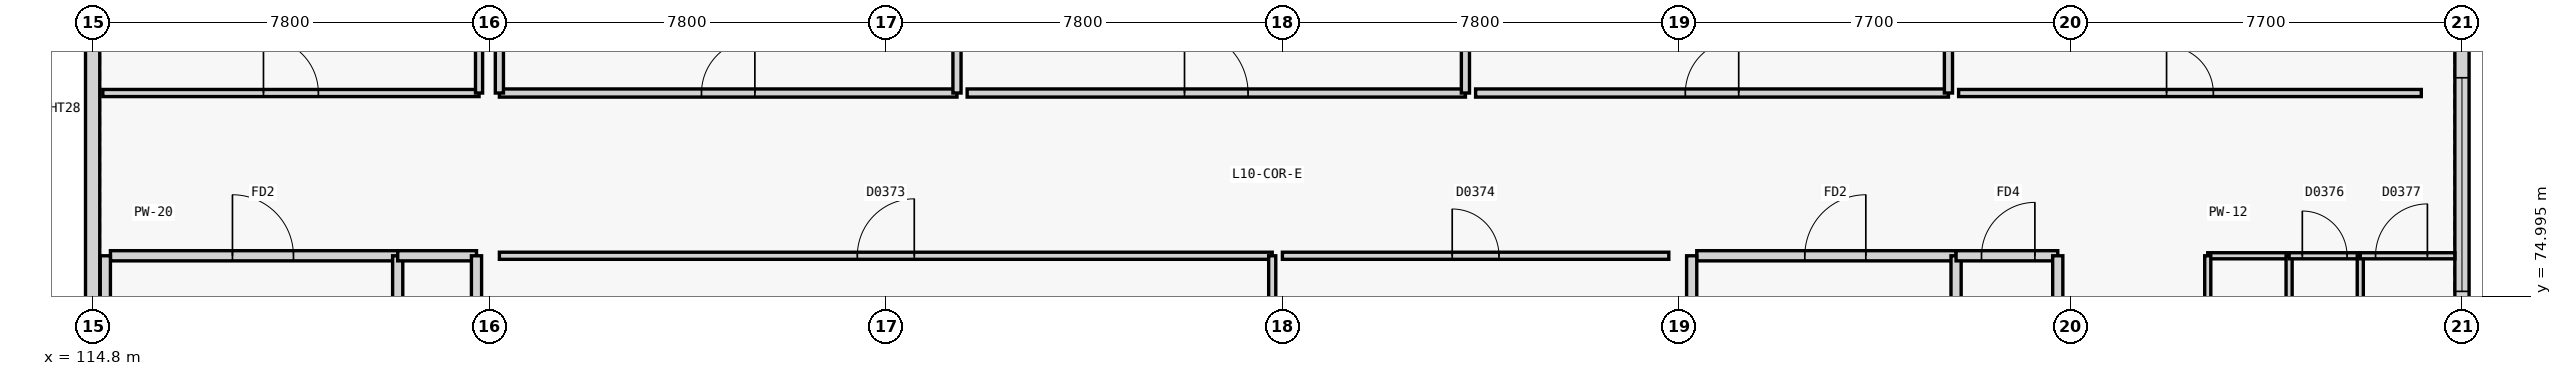
"""IFC4 building model, lengths in metres.
Left out: names, types, materials, properties, quantities, classifications, styles, units other than length and angle.
Written with IfcOpenShell. Run it as: python <this file> out.ifc"""

import sys

from ifc_helpers import new_model, si_unit, direction, frame, frame_2d, origin, place, context, subcontext, project, spatial, rectangle, extrude, element, fill, save


model = new_model("IFC4")
c1 = context("Model", 3, precision=1e-05, world=origin(), true_north=direction((0.0, 1.0)))
c2 = subcontext(c1, "Body", "Model", "MODEL_VIEW")
j1 = project(units=[si_unit("LENGTHUNIT", "METRE"), si_unit("PLANEANGLEUNIT", "RADIAN")], contexts=[c1])
p1 = place(None, origin())
s1 = spatial("IfcSite", under=j1, at=p1, CompositionType="ELEMENT")
p2 = place(p1, origin())
s2 = spatial("IfcBuilding", under=s1, at=p2, CompositionType="ELEMENT")
p3 = place(p2, frame((0.0, 0.0, 39.6)))
s3 = spatial("IfcBuildingStorey", under=s2, at=p3, CompositionType="ELEMENT", Elevation=39.6)
p4 = place(p3, frame((161.4, 96.822, 0.0), z_axis=(0.0, 0.0, 1.0), x_axis=(0.0, -1.0, 0.0)))
e1 = element("IfcWall", 1, at=p4, inside=s3, PredefinedType="SOLIDWALL", context=c2, shape_type="SweptSolid", body=[
    extrude(rectangle(XDim=32.644, YDim=0.28, at=frame_2d((16.322, 0.0))), origin(), (0.0, 0.0, 1.0), 2.79),
])
p5 = place(p4, frame((17.522, 0.0, 0.82)))
e2 = element("IfcOpeningElement", 2, at=p5, cuts=e1, PredefinedType="OPENING", context=c2, shape_type="SweptSolid", body=[
    extrude(rectangle(XDim=4.2, YDim=1.5, at=frame_2d((2.1, 0.75))), frame((0.0, 0.15, 0.0), z_axis=(0.0, -1.0, 0.0), x_axis=(1.0, 0.0, 0.0)), (0.0, 0.0, 1.0), 0.3),
])
p6 = place(p3, frame((114.8, 72.578, 0.0), z_axis=(0.0, 0.0, 1.0), x_axis=(0.0, 1.0, 0.0)))
e3 = element("IfcWall", 3, at=p6, inside=s3, PredefinedType="SOLIDWALL", context=c2, shape_type="SweptSolid", body=[
    extrude(rectangle(XDim=12.244, YDim=0.28, at=frame_2d((6.122, 0.0))), origin(), (0.0, 0.0, 1.0), 2.79),
])
p7 = place(p3, frame((115.15, 75.8, 0.0), z_axis=(0.0, 0.0, 1.0), x_axis=(1.0, 0.0, 0.0)))
e4 = element("IfcWall", 4, at=p7, inside=s3, PredefinedType="PARTITIONING", context=c2, shape_type="SweptSolid", body=[
    extrude(rectangle(XDim=5.65, YDim=0.2, at=frame_2d((2.825, 0.0))), origin(), (0.0, 0.0, 1.0), 3.32),
])
p8 = place(p7, frame((2.4, 0.0, 0.0)))
e5 = element("IfcOpeningElement", 5, at=p8, cuts=e4, PredefinedType="OPENING", context=c2, shape_type="SweptSolid", body=[
    extrude(rectangle(XDim=1.2, YDim=2.2, at=frame_2d((0.6, 1.1))), frame((0.0, 0.11, 0.0), z_axis=(0.0, -1.0, 0.0), x_axis=(1.0, 0.0, 0.0)), (0.0, 0.0, 1.0), 0.22),
])
p9 = place(p3, frame((115.05, 72.4, 0.0), z_axis=(0.0, 0.0, 1.0), x_axis=(0.0, 1.0, 0.0)))
e6 = element("IfcWall", 6, at=p9, inside=s3, PredefinedType="PARTITIONING", context=c2, shape_type="SweptSolid", body=[
    extrude(rectangle(XDim=3.4, YDim=0.2, at=frame_2d((1.7, 0.0))), origin(), (0.0, 0.0, 1.0), 2.79),
])
p10 = place(p3, frame((120.8, 72.4, 0.0), z_axis=(0.0, 0.0, 1.0), x_axis=(0.0, 1.0, 0.0)))
e7 = element("IfcWall", 7, at=p10, inside=s3, PredefinedType="PARTITIONING", context=c2, shape_type="SweptSolid", body=[
    extrude(rectangle(XDim=3.4, YDim=0.2, at=frame_2d((1.7, 0.0))), origin(), (0.0, 0.0, 1.0), 3.32),
])
p11 = place(p10, frame((1.1, 0.0, 0.0)))
e8 = element("IfcOpeningElement", 8, at=p11, cuts=e7, PredefinedType="OPENING", context=c2, shape_type="SweptSolid", body=[
    extrude(rectangle(XDim=1.2, YDim=2.2, at=frame_2d((0.6, 1.1))), frame((0.0, 0.11, 0.0), z_axis=(0.0, -1.0, 0.0), x_axis=(1.0, 0.0, 0.0)), (0.0, 0.0, 1.0), 0.22),
])
p12 = place(p3, frame((120.8, 75.8, 0.0), z_axis=(0.0, 0.0, 1.0), x_axis=(1.0, 0.0, 0.0)))
e9 = element("IfcWall", 9, at=p12, inside=s3, PredefinedType="PARTITIONING", context=c2, shape_type="SweptSolid", body=[
    extrude(rectangle(XDim=1.55, YDim=0.2, at=frame_2d((0.775, 0.0))), origin(), (0.0, 0.0, 1.0), 3.32),
])
p13 = place(p3, frame((122.35, 72.4, 0.0), z_axis=(0.0, 0.0, 1.0), x_axis=(0.0, 1.0, 0.0)))
e10 = element("IfcWall", 10, at=p13, inside=s3, PredefinedType="PARTITIONING", context=c2, shape_type="SweptSolid", body=[
    extrude(rectangle(XDim=3.4, YDim=0.2, at=frame_2d((1.7, 0.0))), origin(), (0.0, 0.0, 1.0), 2.87),
])
p14 = place(p3, frame((146.35, 75.8, 0.0), z_axis=(0.0, 0.0, 1.0), x_axis=(1.0, 0.0, 0.0)))
e11 = element("IfcWall", 11, at=p14, inside=s3, PredefinedType="PARTITIONING", context=c2, shape_type="SweptSolid", body=[
    extrude(rectangle(XDim=5.1, YDim=0.2, at=frame_2d((2.55, 0.0))), origin(), (0.0, 0.0, 1.0), 3.32),
])
p15 = place(p14, frame((2.125, 0.0, 0.0)))
e12 = element("IfcOpeningElement", 12, at=p15, cuts=e11, PredefinedType="OPENING", context=c2, shape_type="SweptSolid", body=[
    extrude(rectangle(XDim=1.2, YDim=2.2, at=frame_2d((0.6, 1.1))), frame((0.0, 0.11, 0.0), z_axis=(0.0, -1.0, 0.0), x_axis=(1.0, 0.0, 0.0)), (0.0, 0.0, 1.0), 0.22),
])
p16 = place(p3, frame((146.25, 72.4, 0.0), z_axis=(0.0, 0.0, 1.0), x_axis=(0.0, 1.0, 0.0)))
e13 = element("IfcWall", 13, at=p16, inside=s3, PredefinedType="PARTITIONING", context=c2, shape_type="SweptSolid", body=[
    extrude(rectangle(XDim=3.4, YDim=0.2, at=frame_2d((1.7, 0.0))), origin(), (0.0, 0.0, 1.0), 2.87),
])
p17 = place(p3, frame((151.45, 72.4, 0.0), z_axis=(0.0, 0.0, 1.0), x_axis=(0.0, 1.0, 0.0)))
e14 = element("IfcWall", 14, at=p17, inside=s3, PredefinedType="PARTITIONING", context=c2, shape_type="SweptSolid", body=[
    extrude(rectangle(XDim=3.4, YDim=0.2, at=frame_2d((1.7, 0.0))), origin(), (0.0, 0.0, 1.0), 3.32),
])
p18 = place(p17, frame((1.1, 0.0, 0.0)))
e15 = element("IfcOpeningElement", 15, at=p18, cuts=e14, PredefinedType="OPENING", context=c2, shape_type="SweptSolid", body=[
    extrude(rectangle(XDim=1.2, YDim=2.2, at=frame_2d((0.6, 1.1))), frame((0.0, 0.11, 0.0), z_axis=(0.0, -1.0, 0.0), x_axis=(1.0, 0.0, 0.0)), (0.0, 0.0, 1.0), 0.22),
])
p19 = place(p3, frame((151.45, 75.8, 0.0), z_axis=(0.0, 0.0, 1.0), x_axis=(1.0, 0.0, 0.0)))
e16 = element("IfcWall", 16, at=p19, inside=s3, PredefinedType="PARTITIONING", context=c2, shape_type="SweptSolid", body=[
    extrude(rectangle(XDim=2.0, YDim=0.2, at=frame_2d((1.0, 0.0))), origin(), (0.0, 0.0, 1.0), 3.32),
])
p20 = place(p19, frame((0.5, 0.0, 0.0)))
e17 = element("IfcOpeningElement", 17, at=p20, cuts=e16, PredefinedType="OPENING", context=c2, shape_type="SweptSolid", body=[
    extrude(rectangle(XDim=1.05, YDim=2.15, at=frame_2d((0.525, 1.075))), frame((0.0, 0.11, 0.0), z_axis=(0.0, -1.0, 0.0), x_axis=(1.0, 0.0, 0.0)), (0.0, 0.0, 1.0), 0.22),
])
p21 = place(p3, frame((153.45, 72.4, 0.0), z_axis=(0.0, 0.0, 1.0), x_axis=(0.0, 1.0, 0.0)))
e18 = element("IfcWall", 18, at=p21, inside=s3, PredefinedType="PARTITIONING", context=c2, shape_type="SweptSolid", body=[
    extrude(rectangle(XDim=3.4, YDim=0.2, at=frame_2d((1.7, 0.0))), origin(), (0.0, 0.0, 1.0), 2.87),
])
p22 = place(p3, frame((115.0, 79.0, 0.0), z_axis=(0.0, 0.0, 1.0), x_axis=(1.0, 0.0, 0.0)))
e19 = element("IfcWall", 19, at=p22, inside=s3, PredefinedType="PARTITIONING", context=c2, shape_type="SweptSolid", body=[
    extrude(rectangle(XDim=7.4, YDim=0.14, at=frame_2d((3.7, 0.0))), origin(), (0.0, 0.0, 1.0), 3.34),
])
p23 = place(p22, frame((3.16, 0.0, 0.0)))
e20 = element("IfcOpeningElement", 20, at=p23, cuts=e19, PredefinedType="OPENING", context=c2, shape_type="SweptSolid", body=[
    extrude(rectangle(XDim=1.08, YDim=2.2, at=frame_2d((0.54, 1.1))), frame((0.0, 0.08, 0.0), z_axis=(0.0, -1.0, 0.0), x_axis=(1.0, 0.0, 0.0)), (0.0, 0.0, 1.0), 0.16),
])
p24 = place(p3, frame((122.4, 79.0, 0.0), z_axis=(0.0, 0.0, 1.0), x_axis=(0.0, 1.0, 0.0)))
e21 = element("IfcWall", 21, at=p24, inside=s3, PredefinedType="PARTITIONING", context=c2, shape_type="SweptSolid", body=[
    extrude(rectangle(XDim=5.4, YDim=0.14, at=frame_2d((2.7, 0.0))), origin(), (0.0, 0.0, 1.0), 2.87),
])
p25 = place(p3, frame((122.8, 75.8, 0.0), z_axis=(0.0, 0.0, 1.0), x_axis=(1.0, 0.0, 0.0)))
e22 = element("IfcWall", 22, at=p25, inside=s3, PredefinedType="PARTITIONING", context=c2, shape_type="SweptSolid", body=[
    extrude(rectangle(XDim=15.2, YDim=0.14, at=frame_2d((7.6, 0.0))), origin(), (0.0, 0.0, 1.0), 3.34),
])
p26 = place(p25, frame((7.04, 0.0, 0.0)))
e23 = element("IfcOpeningElement", 23, at=p26, cuts=e22, PredefinedType="OPENING", context=c2, shape_type="SweptSolid", body=[
    extrude(rectangle(XDim=1.12, YDim=2.15, at=frame_2d((0.56, 1.075))), frame((0.0, 0.08, 0.0), z_axis=(0.0, -1.0, 0.0), x_axis=(1.0, 0.0, 0.0)), (0.0, 0.0, 1.0), 0.16),
])
p27 = place(p3, frame((138.0, 65.2, 0.0), z_axis=(0.0, 0.0, 1.0), x_axis=(0.0, 1.0, 0.0)))
e24 = element("IfcWall", 24, at=p27, inside=s3, PredefinedType="PARTITIONING", context=c2, shape_type="SweptSolid", body=[
    extrude(rectangle(XDim=10.6, YDim=0.14, at=frame_2d((5.3, 0.0))), origin(), (0.0, 0.0, 1.0), 2.87),
])
p28 = place(p3, frame((138.2, 75.8, 0.0), z_axis=(0.0, 0.0, 1.0), x_axis=(1.0, 0.0, 0.0)))
e25 = element("IfcWall", 25, at=p28, inside=s3, PredefinedType="PARTITIONING", context=c2, shape_type="SweptSolid", body=[
    extrude(rectangle(XDim=7.6, YDim=0.14, at=frame_2d((3.8, 0.0))), origin(), (0.0, 0.0, 1.0), 3.34),
])
p29 = place(p28, frame((3.34, 0.0, 0.0)))
e26 = element("IfcOpeningElement", 26, at=p29, cuts=e25, PredefinedType="OPENING", context=c2, shape_type="SweptSolid", body=[
    extrude(rectangle(XDim=0.92, YDim=2.15, at=frame_2d((0.46, 1.075))), frame((0.0, 0.08, 0.0), z_axis=(0.0, -1.0, 0.0), x_axis=(1.0, 0.0, 0.0)), (0.0, 0.0, 1.0), 0.16),
])
p30 = place(p3, frame((156.4, 75.8, 0.0), z_axis=(0.0, 0.0, 1.0), x_axis=(1.0, 0.0, 0.0)))
e27 = element("IfcWall", 27, at=p30, inside=s3, PredefinedType="PARTITIONING", context=c2, shape_type="SweptSolid", body=[
    extrude(rectangle(XDim=1.6, YDim=0.12, at=frame_2d((0.8, 0.0))), origin(), (0.0, 0.0, 1.0), 3.34),
])
p31 = place(p3, frame((156.4, 70.6, 0.0), z_axis=(0.0, 0.0, 1.0), x_axis=(0.0, 1.0, 0.0)))
e28 = element("IfcWall", 28, at=p31, inside=s3, PredefinedType="PARTITIONING", context=c2, shape_type="SweptSolid", body=[
    extrude(rectangle(XDim=5.2, YDim=0.12, at=frame_2d((2.6, 0.0))), origin(), (0.0, 0.0, 1.0), 3.34),
])
p32 = place(p31, frame((2.16, 0.0, 0.0)))
e29 = element("IfcOpeningElement", 29, at=p32, cuts=e28, PredefinedType="OPENING", context=c2, shape_type="SweptSolid", body=[
    extrude(rectangle(XDim=0.88, YDim=2.1, at=frame_2d((0.44, 1.05))), frame((0.0, 0.07, 0.0), z_axis=(0.0, -1.0, 0.0), x_axis=(1.0, 0.0, 0.0)), (0.0, 0.0, 1.0), 0.14),
])
p33 = place(p3, frame((158.0, 70.6, 0.0), z_axis=(0.0, 0.0, 1.0), x_axis=(0.0, 1.0, 0.0)))
e30 = element("IfcWall", 30, at=p33, inside=s3, PredefinedType="PARTITIONING", context=c2, shape_type="SweptSolid", body=[
    extrude(rectangle(XDim=5.2, YDim=0.12, at=frame_2d((2.6, 0.0))), origin(), (0.0, 0.0, 1.0), 3.34),
])
p34 = place(p3, frame((158.0, 75.8, 0.0), z_axis=(0.0, 0.0, 1.0), x_axis=(1.0, 0.0, 0.0)))
e31 = element("IfcWall", 31, at=p34, inside=s3, PredefinedType="PARTITIONING", context=c2, shape_type="SweptSolid", body=[
    extrude(rectangle(XDim=1.4, YDim=0.12, at=frame_2d((0.7, 0.0))), origin(), (0.0, 0.0, 1.0), 3.34),
])
p35 = place(p34, frame((0.26, 0.0, 0.0)))
e32 = element("IfcOpeningElement", 32, at=p35, cuts=e31, PredefinedType="OPENING", context=c2, shape_type="SweptSolid", body=[
    extrude(rectangle(XDim=0.88, YDim=2.1, at=frame_2d((0.44, 1.05))), frame((0.0, 0.07, 0.0), z_axis=(0.0, -1.0, 0.0), x_axis=(1.0, 0.0, 0.0)), (0.0, 0.0, 1.0), 0.14),
])
p36 = place(p3, frame((159.4, 70.6, 0.0), z_axis=(0.0, 0.0, 1.0), x_axis=(0.0, 1.0, 0.0)))
e33 = element("IfcWall", 33, at=p36, inside=s3, PredefinedType="PARTITIONING", context=c2, shape_type="SweptSolid", body=[
    extrude(rectangle(XDim=5.2, YDim=0.12, at=frame_2d((2.6, 0.0))), origin(), (0.0, 0.0, 1.0), 3.34),
])
p37 = place(p3, frame((159.4, 75.8, 0.0), z_axis=(0.0, 0.0, 1.0), x_axis=(1.0, 0.0, 0.0)))
e34 = element("IfcWall", 34, at=p37, inside=s3, PredefinedType="PARTITIONING", context=c2, shape_type="SweptSolid", body=[
    extrude(rectangle(XDim=1.86, YDim=0.12, at=frame_2d((0.93, 0.0))), origin(), (0.0, 0.0, 1.0), 3.34),
])
p38 = place(p37, frame((0.3, 0.0, 0.0)))
e35 = element("IfcOpeningElement", 35, at=p38, cuts=e34, PredefinedType="OPENING", context=c2, shape_type="SweptSolid", body=[
    extrude(rectangle(XDim=1.02, YDim=2.1, at=frame_2d((0.51, 1.05))), frame((0.0, 0.07, 0.0), z_axis=(0.0, -1.0, 0.0), x_axis=(1.0, 0.0, 0.0)), (0.0, 0.0, 1.0), 0.14),
])
p39 = place(p3, frame((122.8, 79.0, 0.0), z_axis=(0.0, 0.0, 1.0), x_axis=(1.0, 0.0, 0.0)))
e36 = element("IfcWall", 36, at=p39, inside=s3, PredefinedType="PARTITIONING", context=c2, shape_type="SweptSolid", body=[
    extrude(rectangle(XDim=9.0, YDim=0.16, at=frame_2d((4.5, 0.0))), origin(), (0.0, 0.0, 1.0), 3.34),
])
p40 = place(p39, frame((3.975, 0.0, 0.0)))
e37 = element("IfcOpeningElement", 37, at=p40, cuts=e36, PredefinedType="OPENING", context=c2, shape_type="SweptSolid", body=[
    extrude(rectangle(XDim=1.05, YDim=2.15, at=frame_2d((0.525, 1.075))), frame((0.0, 0.09, 0.0), z_axis=(0.0, -1.0, 0.0), x_axis=(1.0, 0.0, 0.0)), (0.0, 0.0, 1.0), 0.18),
])
p41 = place(p3, frame((122.8, 79.0, 0.0), z_axis=(0.0, 0.0, 1.0), x_axis=(0.0, 1.0, 0.0)))
e38 = element("IfcWall", 38, at=p41, inside=s3, PredefinedType="PARTITIONING", context=c2, shape_type="SweptSolid", body=[
    extrude(rectangle(XDim=17.6, YDim=0.16, at=frame_2d((8.8, 0.0))), origin(), (0.0, 0.0, 1.0), 2.87),
])
p42 = place(p3, frame((131.8, 79.0, 0.0), z_axis=(0.0, 0.0, 1.0), x_axis=(0.0, 1.0, 0.0)))
e39 = element("IfcWall", 39, at=p42, inside=s3, PredefinedType="PARTITIONING", context=c2, shape_type="SweptSolid", body=[
    extrude(rectangle(XDim=17.6, YDim=0.16, at=frame_2d((8.8, 0.0))), origin(), (0.0, 0.0, 1.0), 3.34),
])
p43 = place(p3, frame((132.0, 79.0, 0.0), z_axis=(0.0, 0.0, 1.0), x_axis=(1.0, 0.0, 0.0)))
e40 = element("IfcWall", 40, at=p43, inside=s3, PredefinedType="PARTITIONING", context=c2, shape_type="SweptSolid", body=[
    extrude(rectangle(XDim=9.8, YDim=0.16, at=frame_2d((4.9, 0.0))), origin(), (0.0, 0.0, 1.0), 3.34),
])
p44 = place(p43, frame((4.275, 0.0, 0.0)))
e41 = element("IfcOpeningElement", 41, at=p44, cuts=e40, PredefinedType="OPENING", context=c2, shape_type="SweptSolid", body=[
    extrude(rectangle(XDim=1.25, YDim=2.2, at=frame_2d((0.625, 1.1))), frame((0.0, 0.09, 0.0), z_axis=(0.0, -1.0, 0.0), x_axis=(1.0, 0.0, 0.0)), (0.0, 0.0, 1.0), 0.18),
])
p45 = place(p3, frame((141.8, 79.0, 0.0), z_axis=(0.0, 0.0, 1.0), x_axis=(0.0, 1.0, 0.0)))
e42 = element("IfcWall", 42, at=p45, inside=s3, PredefinedType="PARTITIONING", context=c2, shape_type="SweptSolid", body=[
    extrude(rectangle(XDim=17.6, YDim=0.16, at=frame_2d((8.8, 0.0))), origin(), (0.0, 0.0, 1.0), 2.91),
])
p46 = place(p3, frame((142.0, 79.0, 0.0), z_axis=(0.0, 0.0, 1.0), x_axis=(1.0, 0.0, 0.0)))
e43 = element("IfcWall", 43, at=p46, inside=s3, PredefinedType="PARTITIONING", context=c2, shape_type="SweptSolid", body=[
    extrude(rectangle(XDim=9.3, YDim=0.16, at=frame_2d((4.65, 0.0))), origin(), (0.0, 0.0, 1.0), 3.34),
])
p47 = place(p46, frame((4.125, 0.0, 0.0)))
e44 = element("IfcOpeningElement", 44, at=p47, cuts=e43, PredefinedType="OPENING", context=c2, shape_type="SweptSolid", body=[
    extrude(rectangle(XDim=1.05, YDim=2.15, at=frame_2d((0.525, 1.075))), frame((0.0, 0.09, 0.0), z_axis=(0.0, -1.0, 0.0), x_axis=(1.0, 0.0, 0.0)), (0.0, 0.0, 1.0), 0.18),
])
p48 = place(p3, frame((151.3, 79.0, 0.0), z_axis=(0.0, 0.0, 1.0), x_axis=(0.0, 1.0, 0.0)))
e45 = element("IfcWall", 45, at=p48, inside=s3, PredefinedType="PARTITIONING", context=c2, shape_type="SweptSolid", body=[
    extrude(rectangle(XDim=17.6, YDim=0.16, at=frame_2d((8.8, 0.0))), origin(), (0.0, 0.0, 1.0), 3.34),
])
p49 = place(p3, frame((151.5, 79.0, 0.0), z_axis=(0.0, 0.0, 1.0), x_axis=(1.0, 0.0, 0.0)))
e46 = element("IfcWall", 46, at=p49, inside=s3, PredefinedType="PARTITIONING", context=c2, shape_type="SweptSolid", body=[
    extrude(rectangle(XDim=9.1, YDim=0.14, at=frame_2d((4.55, 0.0))), origin(), (0.0, 0.0, 1.0), 3.34),
])
p50 = place(p49, frame((4.09, 0.0, 0.0)))
e47 = element("IfcOpeningElement", 47, at=p50, cuts=e46, PredefinedType="OPENING", context=c2, shape_type="SweptSolid", body=[
    extrude(rectangle(XDim=0.92, YDim=2.15, at=frame_2d((0.46, 1.075))), frame((0.0, 0.08, 0.0), z_axis=(0.0, -1.0, 0.0), x_axis=(1.0, 0.0, 0.0)), (0.0, 0.0, 1.0), 0.16),
])
p51 = place(p5, origin())
e48 = element("IfcWindow", 48, at=p51, inside=s3, PartitioningType="SINGLE_PANEL", PredefinedType="WINDOW", context=c2, shape_type="SweptSolid", body=[
    extrude(rectangle(XDim=4.2, YDim=1.5, at=frame_2d((2.1, 0.75))), frame((0.0, 0.03, 0.0), z_axis=(0.0, -1.0, 0.0), x_axis=(1.0, 0.0, 0.0)), (0.0, 0.0, 1.0), 0.06),
])
fill(e2, e48)
p52 = place(p8, origin())
e49 = element("IfcDoor", 49, at=p52, inside=s3, OperationType="SINGLE_SWING_LEFT", PredefinedType="DOOR", context=c2, shape_type="SweptSolid", body=[
    extrude(rectangle(XDim=1.2, YDim=2.2, at=frame_2d((0.6, 1.1))), frame((0.0, 0.025, 0.0), z_axis=(0.0, -1.0, 0.0), x_axis=(1.0, 0.0, 0.0)), (0.0, 0.0, 1.0), 0.05),
])
fill(e5, e49)
p53 = place(p15, origin())
e50 = element("IfcDoor", 50, at=p53, inside=s3, OperationType="SINGLE_SWING_RIGHT", PredefinedType="DOOR", context=c2, shape_type="SweptSolid", body=[
    extrude(rectangle(XDim=1.2, YDim=2.2, at=frame_2d((0.6, 1.1))), frame((0.0, 0.025, 0.0), z_axis=(0.0, -1.0, 0.0), x_axis=(1.0, 0.0, 0.0)), (0.0, 0.0, 1.0), 0.05),
])
fill(e12, e50)
p54 = place(p20, origin())
e51 = element("IfcDoor", 51, at=p54, inside=s3, OperationType="SINGLE_SWING_RIGHT", PredefinedType="DOOR", context=c2, shape_type="SweptSolid", body=[
    extrude(rectangle(XDim=1.05, YDim=2.15, at=frame_2d((0.525, 1.075))), frame((0.0, 0.025, 0.0), z_axis=(0.0, -1.0, 0.0), x_axis=(1.0, 0.0, 0.0)), (0.0, 0.0, 1.0), 0.05),
])
fill(e17, e51)
p55 = place(p23, origin())
e52 = element("IfcDoor", 52, at=p55, inside=s3, OperationType="SINGLE_SWING_LEFT", PredefinedType="DOOR", context=c2, shape_type="SweptSolid", body=[
    extrude(rectangle(XDim=1.08, YDim=2.2, at=frame_2d((0.54, 1.1))), frame((0.0, 0.025, 0.0), z_axis=(0.0, -1.0, 0.0), x_axis=(1.0, 0.0, 0.0)), (0.0, 0.0, 1.0), 0.05),
])
fill(e20, e52)
p56 = place(p26, origin())
e53 = element("IfcDoor", 53, at=p56, inside=s3, OperationType="SINGLE_SWING_RIGHT", PredefinedType="DOOR", context=c2, shape_type="SweptSolid", body=[
    extrude(rectangle(XDim=1.12, YDim=2.15, at=frame_2d((0.56, 1.075))), frame((0.0, 0.025, 0.0), z_axis=(0.0, -1.0, 0.0), x_axis=(1.0, 0.0, 0.0)), (0.0, 0.0, 1.0), 0.05),
])
fill(e23, e53)
p57 = place(p29, origin())
e54 = element("IfcDoor", 54, at=p57, inside=s3, OperationType="SINGLE_SWING_LEFT", PredefinedType="DOOR", context=c2, shape_type="SweptSolid", body=[
    extrude(rectangle(XDim=0.92, YDim=2.15, at=frame_2d((0.46, 1.075))), frame((0.0, 0.025, 0.0), z_axis=(0.0, -1.0, 0.0), x_axis=(1.0, 0.0, 0.0)), (0.0, 0.0, 1.0), 0.05),
])
fill(e26, e54)
p58 = place(p35, origin())
e55 = element("IfcDoor", 55, at=p58, inside=s3, OperationType="SINGLE_SWING_LEFT", PredefinedType="DOOR", context=c2, shape_type="SweptSolid", body=[
    extrude(rectangle(XDim=0.88, YDim=2.1, at=frame_2d((0.44, 1.05))), frame((0.0, 0.025, 0.0), z_axis=(0.0, -1.0, 0.0), x_axis=(1.0, 0.0, 0.0)), (0.0, 0.0, 1.0), 0.05),
])
fill(e32, e55)
p59 = place(p38, origin())
e56 = element("IfcDoor", 56, at=p59, inside=s3, OperationType="SINGLE_SWING_RIGHT", PredefinedType="DOOR", context=c2, shape_type="SweptSolid", body=[
    extrude(rectangle(XDim=1.02, YDim=2.1, at=frame_2d((0.51, 1.05))), frame((0.0, 0.025, 0.0), z_axis=(0.0, -1.0, 0.0), x_axis=(1.0, 0.0, 0.0)), (0.0, 0.0, 1.0), 0.05),
])
fill(e35, e56)
p60 = place(p40, origin())
e57 = element("IfcDoor", 57, at=p60, inside=s3, OperationType="SINGLE_SWING_RIGHT", PredefinedType="DOOR", context=c2, shape_type="SweptSolid", body=[
    extrude(rectangle(XDim=1.05, YDim=2.15, at=frame_2d((0.525, 1.075))), frame((0.0, 0.025, 0.0), z_axis=(0.0, -1.0, 0.0), x_axis=(1.0, 0.0, 0.0)), (0.0, 0.0, 1.0), 0.05),
])
fill(e37, e57)
p61 = place(p44, origin())
e58 = element("IfcDoor", 58, at=p61, inside=s3, OperationType="SINGLE_SWING_LEFT", PredefinedType="DOOR", context=c2, shape_type="SweptSolid", body=[
    extrude(rectangle(XDim=1.25, YDim=2.2, at=frame_2d((0.625, 1.1))), frame((0.0, 0.025, 0.0), z_axis=(0.0, -1.0, 0.0), x_axis=(1.0, 0.0, 0.0)), (0.0, 0.0, 1.0), 0.05),
])
fill(e41, e58)
p62 = place(p47, origin())
e59 = element("IfcDoor", 59, at=p62, inside=s3, OperationType="SINGLE_SWING_RIGHT", PredefinedType="DOOR", context=c2, shape_type="SweptSolid", body=[
    extrude(rectangle(XDim=1.05, YDim=2.15, at=frame_2d((0.525, 1.075))), frame((0.0, 0.025, 0.0), z_axis=(0.0, -1.0, 0.0), x_axis=(1.0, 0.0, 0.0)), (0.0, 0.0, 1.0), 0.05),
])
fill(e44, e59)
p63 = place(p50, origin())
e60 = element("IfcDoor", 60, at=p63, inside=s3, OperationType="SINGLE_SWING_LEFT", PredefinedType="DOOR", context=c2, shape_type="SweptSolid", body=[
    extrude(rectangle(XDim=0.92, YDim=2.15, at=frame_2d((0.46, 1.075))), frame((0.0, 0.025, 0.0), z_axis=(0.0, -1.0, 0.0), x_axis=(1.0, 0.0, 0.0)), (0.0, 0.0, 1.0), 0.05),
])
fill(e47, e60)
save(model, sys.argv[1])
